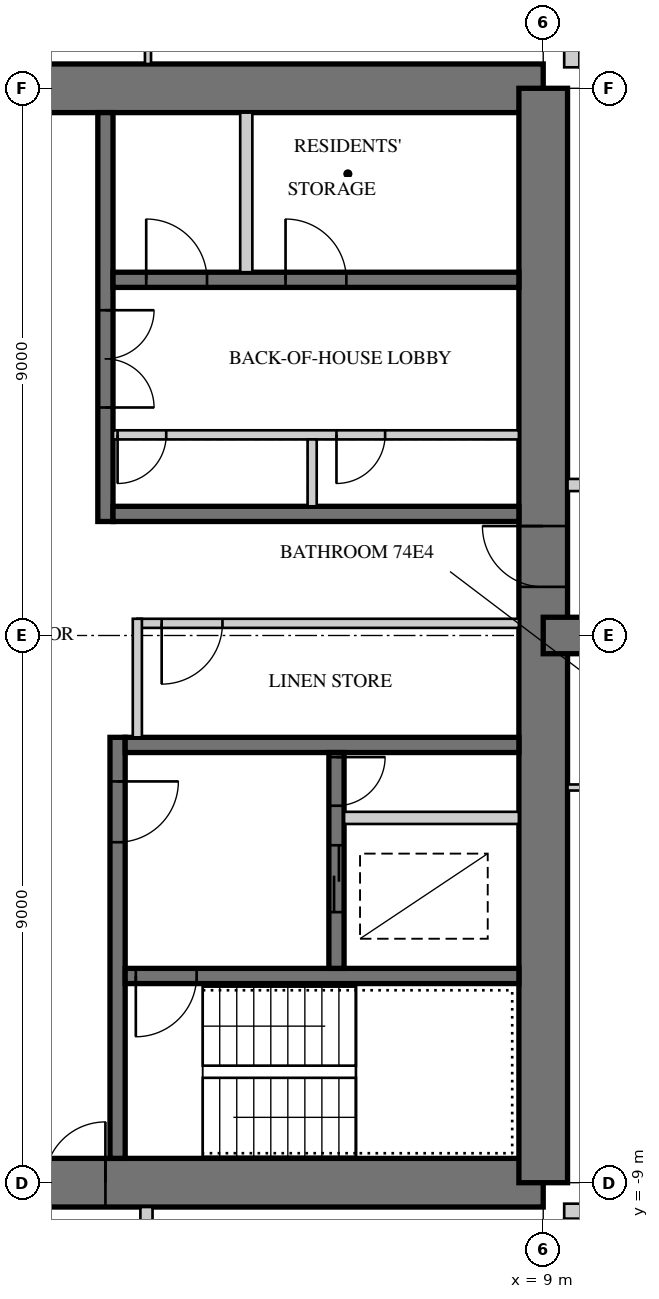
"""IFC4 building model, lengths in metres.
Left out: names, types, materials, properties, quantities, classifications, styles, units other than length and angle.
Written with IfcOpenShell. Run it as: python <this file> out.ifc"""

import sys

from ifc_helpers import new_model, si_unit, direction, frame, frame_2d, origin, place, context, subcontext, project, spatial, rectangle, extrude, element, fill, save


model = new_model("IFC4")
c1 = context("Model", 3, precision=1e-05, world=origin(), true_north=direction((0.0, 1.0)))
c2 = subcontext(c1, "Body", "Model", "MODEL_VIEW")
j1 = project(units=[si_unit("LENGTHUNIT", "METRE"), si_unit("PLANEANGLEUNIT", "RADIAN")], contexts=[c1])
p1 = place(None, origin())
s1 = spatial("IfcSite", under=j1, at=p1, CompositionType="ELEMENT")
p2 = place(p1, origin())
s2 = spatial("IfcBuilding", under=s1, at=p2, CompositionType="ELEMENT")
p3 = place(p2, frame((0.0, 0.0, 284.9)))
s3 = spatial("IfcBuildingStorey", under=s2, at=p3, CompositionType="ELEMENT", Elevation=284.9)
p4 = place(p3, frame((9.0, 9.0, 0.0), z_axis=(0.0, 0.0, 1.0), x_axis=(-1.0, 0.0, 0.0)))
e1 = element("IfcWall", 1, at=p4, inside=s3, PredefinedType="SHEAR", context=c2, shape_type="SweptSolid", body=[
    extrude(rectangle(XDim=18.0, YDim=0.8, at=frame_2d((9.0, 0.0))), origin(), (0.0, 0.0, 1.0), 3.4),
])
p5 = place(p4, frame((9.8, 0.0, 0.0)))
e2 = element("IfcOpeningElement", 2, at=p5, cuts=e1, PredefinedType="OPENING", context=c2, shape_type="SweptSolid", body=[
    extrude(rectangle(XDim=1.0, YDim=2.4, at=frame_2d((0.5, 1.2))), frame((0.0, 0.41, 0.0), z_axis=(0.0, -1.0, 0.0), x_axis=(1.0, 0.0, 0.0)), (0.0, 0.0, 1.0), 0.82),
])
p6 = place(p3, frame((-9.0, -9.0, 0.0), z_axis=(0.0, 0.0, 1.0), x_axis=(1.0, 0.0, 0.0)))
e3 = element("IfcWall", 3, at=p6, inside=s3, PredefinedType="SHEAR", context=c2, shape_type="SweptSolid", body=[
    extrude(rectangle(XDim=18.0, YDim=0.8, at=frame_2d((9.0, 0.0))), origin(), (0.0, 0.0, 1.0), 3.4),
])
p7 = place(p6, frame((9.8, 0.0, 0.0)))
e4 = element("IfcOpeningElement", 4, at=p7, cuts=e3, PredefinedType="OPENING", context=c2, shape_type="SweptSolid", body=[
    extrude(rectangle(XDim=1.0, YDim=2.4, at=frame_2d((0.5, 1.2))), frame((0.0, 0.41, 0.0), z_axis=(0.0, -1.0, 0.0), x_axis=(1.0, 0.0, 0.0)), (0.0, 0.0, 1.0), 0.82),
])
p8 = place(p3, frame((9.0, -9.0, 0.0), z_axis=(0.0, 0.0, 1.0), x_axis=(0.0, 1.0, 0.0)))
e5 = element("IfcWall", 5, at=p8, inside=s3, PredefinedType="SHEAR", context=c2, shape_type="SweptSolid", body=[
    extrude(rectangle(XDim=18.0, YDim=0.8, at=frame_2d((9.0, 0.0))), origin(), (0.0, 0.0, 1.0), 3.4),
])
p9 = place(p8, frame((9.8, 0.0, 0.0)))
e6 = element("IfcOpeningElement", 6, at=p9, cuts=e5, PredefinedType="OPENING", context=c2, shape_type="SweptSolid", body=[
    extrude(rectangle(XDim=1.0, YDim=2.4, at=frame_2d((0.5, 1.2))), frame((0.0, 0.41, 0.0), z_axis=(0.0, -1.0, 0.0), x_axis=(1.0, 0.0, 0.0)), (0.0, 0.0, 1.0), 0.82),
])
p10 = place(p3, frame((1.8, 1.875, 0.0), z_axis=(0.0, 0.0, 1.0), x_axis=(0.0, 1.0, 0.0)))
e7 = element("IfcWall", 7, at=p10, inside=s3, PredefinedType="SHEAR", context=c2, shape_type="SweptSolid", body=[
    extrude(rectangle(XDim=6.725, YDim=0.25, at=frame_2d((3.363, 0.0))), origin(), (0.0, 0.0, 1.0), 3.4),
])
p11 = place(p10, frame((1.875, 0.0, 0.0)))
e8 = element("IfcOpeningElement", 8, at=p11, cuts=e7, PredefinedType="OPENING", context=c2, shape_type="SweptSolid", body=[
    extrude(rectangle(XDim=1.6, YDim=2.4, at=frame_2d((0.8, 1.2))), frame((0.0, 0.135, 0.0), z_axis=(0.0, -1.0, 0.0), x_axis=(1.0, 0.0, 0.0)), (0.0, 0.0, 1.0), 0.27),
])
p12 = place(p3, frame((1.925, 2.0, 0.0), z_axis=(0.0, 0.0, 1.0), x_axis=(1.0, 0.0, 0.0)))
e9 = element("IfcWall", 9, at=p12, inside=s3, PredefinedType="SHEAR", context=c2, shape_type="SweptSolid", body=[
    extrude(rectangle(XDim=6.675, YDim=0.25, at=frame_2d((3.337, 0.0))), origin(), (0.0, 0.0, 1.0), 3.4),
])
p13 = place(p3, frame((1.925, 5.85, 0.0), z_axis=(0.0, 0.0, 1.0), x_axis=(1.0, 0.0, 0.0)))
e10 = element("IfcWall", 10, at=p13, inside=s3, PredefinedType="SHEAR", context=c2, shape_type="SweptSolid", body=[
    extrude(rectangle(XDim=6.675, YDim=0.25, at=frame_2d((3.337, 0.0))), origin(), (0.0, 0.0, 1.0), 3.4),
])
p14 = place(p13, frame((0.546, 0.0, 0.0)))
e11 = element("IfcOpeningElement", 11, at=p14, cuts=e10, PredefinedType="OPENING", context=c2, shape_type="SweptSolid", body=[
    extrude(rectangle(XDim=1.0, YDim=2.1, at=frame_2d((0.5, 1.05))), frame((0.0, 0.135, 0.0), z_axis=(0.0, -1.0, 0.0), x_axis=(1.0, 0.0, 0.0)), (0.0, 0.0, 1.0), 0.27),
])
p15 = place(p13, frame((2.837, 0.0, 0.0)))
e12 = element("IfcOpeningElement", 12, at=p15, cuts=e10, PredefinedType="OPENING", context=c2, shape_type="SweptSolid", body=[
    extrude(rectangle(XDim=1.0, YDim=2.1, at=frame_2d((0.5, 1.05))), frame((0.0, 0.135, 0.0), z_axis=(0.0, -1.0, 0.0), x_axis=(1.0, 0.0, 0.0)), (0.0, 0.0, 1.0), 0.27),
])
p16 = place(p3, frame((1.925, 3.3, 0.0), z_axis=(0.0, 0.0, 1.0), x_axis=(1.0, 0.0, 0.0)))
e13 = element("IfcWall", 13, at=p16, inside=s3, PredefinedType="PARTITIONING", context=c2, shape_type="SweptSolid", body=[
    extrude(rectangle(XDim=6.675, YDim=0.15, at=frame_2d((3.337, 0.0))), origin(), (0.0, 0.0, 1.0), 3.4),
])
p17 = place(p16, frame((0.075, 0.0, 0.0)))
e14 = element("IfcOpeningElement", 14, at=p17, cuts=e13, PredefinedType="OPENING", context=c2, shape_type="SweptSolid", body=[
    extrude(rectangle(XDim=0.8, YDim=2.1, at=frame_2d((0.4, 1.05))), frame((0.0, 0.085, 0.0), z_axis=(0.0, -1.0, 0.0), x_axis=(1.0, 0.0, 0.0)), (0.0, 0.0, 1.0), 0.17),
])
p18 = place(p16, frame((3.675, 0.0, 0.0)))
e15 = element("IfcOpeningElement", 15, at=p18, cuts=e13, PredefinedType="OPENING", context=c2, shape_type="SweptSolid", body=[
    extrude(rectangle(XDim=0.8, YDim=2.1, at=frame_2d((0.4, 1.05))), frame((0.0, 0.085, 0.0), z_axis=(0.0, -1.0, 0.0), x_axis=(1.0, 0.0, 0.0)), (0.0, 0.0, 1.0), 0.17),
])
p19 = place(p3, frame((5.2, 2.125, 0.0), z_axis=(0.0, 0.0, 1.0), x_axis=(0.0, 1.0, 0.0)))
e16 = element("IfcWall", 16, at=p19, inside=s3, PredefinedType="PARTITIONING", context=c2, shape_type="SweptSolid", body=[
    extrude(rectangle(XDim=1.1, YDim=0.15, at=frame_2d((0.55, 0.0))), origin(), (0.0, 0.0, 1.0), 3.4),
])
p20 = place(p3, frame((4.117, 5.975, 0.0), z_axis=(0.0, 0.0, 1.0), x_axis=(0.0, 1.0, 0.0)))
e17 = element("IfcWall", 17, at=p20, inside=s3, PredefinedType="PARTITIONING", context=c2, shape_type="SweptSolid", body=[
    extrude(rectangle(XDim=2.625, YDim=0.2, at=frame_2d((1.312, 0.0))), origin(), (0.0, 0.0, 1.0), 3.4),
])
p21 = place(p3, frame((2.0, -1.675, 0.0), z_axis=(0.0, 0.0, 1.0), x_axis=(0.0, -1.0, 0.0)))
e18 = element("IfcWall", 18, at=p21, inside=s3, PredefinedType="SHEAR", context=c2, shape_type="SweptSolid", body=[
    extrude(rectangle(XDim=6.925, YDim=0.25, at=frame_2d((3.462, 0.0))), origin(), (0.0, 0.0, 1.0), 3.4),
])
p22 = place(p21, frame((0.725, 0.0, 0.0)))
e19 = element("IfcOpeningElement", 19, at=p22, cuts=e18, PredefinedType="OPENING", context=c2, shape_type="SweptSolid", body=[
    extrude(rectangle(XDim=1.0, YDim=2.1, at=frame_2d((0.5, 1.05))), frame((0.0, 0.135, 0.0), z_axis=(0.0, -1.0, 0.0), x_axis=(1.0, 0.0, 0.0)), (0.0, 0.0, 1.0), 0.27),
])
p23 = place(p3, frame((2.125, -1.8, 0.0), z_axis=(0.0, 0.0, 1.0), x_axis=(1.0, 0.0, 0.0)))
e20 = element("IfcWall", 20, at=p23, inside=s3, PredefinedType="SHEAR", context=c2, shape_type="SweptSolid", body=[
    extrude(rectangle(XDim=6.475, YDim=0.25, at=frame_2d((3.238, 0.0))), origin(), (0.0, 0.0, 1.0), 3.4),
])
p24 = place(p3, frame((2.125, -5.6, 0.0), z_axis=(0.0, 0.0, 1.0), x_axis=(1.0, 0.0, 0.0)))
e21 = element("IfcWall", 21, at=p24, inside=s3, PredefinedType="SHEAR", context=c2, shape_type="SweptSolid", body=[
    extrude(rectangle(XDim=6.475, YDim=0.25, at=frame_2d((3.238, 0.0))), origin(), (0.0, 0.0, 1.0), 3.4),
])
p25 = place(p24, frame((0.175, 0.0, 0.0)))
e22 = element("IfcOpeningElement", 22, at=p25, cuts=e21, PredefinedType="OPENING", context=c2, shape_type="SweptSolid", body=[
    extrude(rectangle(XDim=1.0, YDim=2.1, at=frame_2d((0.5, 1.05))), frame((0.0, 0.135, 0.0), z_axis=(0.0, -1.0, 0.0), x_axis=(1.0, 0.0, 0.0)), (0.0, 0.0, 1.0), 0.27),
])
p26 = place(p3, frame((5.6, -1.925, 0.0), z_axis=(0.0, 0.0, 1.0), x_axis=(0.0, -1.0, 0.0)))
e23 = element("IfcWall", 23, at=p26, inside=s3, PredefinedType="SHEAR", context=c2, shape_type="SweptSolid", body=[
    extrude(rectangle(XDim=3.55, YDim=0.25, at=frame_2d((1.775, 0.0))), origin(), (0.0, 0.0, 1.0), 3.4),
])
p27 = place(p26, frame((1.525, 0.0, 0.0)))
e24 = element("IfcOpeningElement", 24, at=p27, cuts=e23, PredefinedType="OPENING", context=c2, shape_type="SweptSolid", body=[
    extrude(rectangle(XDim=1.1, YDim=2.2, at=frame_2d((0.55, 1.1))), frame((0.0, 0.135, 0.0), z_axis=(0.0, -1.0, 0.0), x_axis=(1.0, 0.0, 0.0)), (0.0, 0.0, 1.0), 0.27),
])
p28 = place(p26, frame((0.075, 0.0, 0.0)))
e25 = element("IfcOpeningElement", 25, at=p28, cuts=e23, PredefinedType="OPENING", context=c2, shape_type="SweptSolid", body=[
    extrude(rectangle(XDim=0.8, YDim=2.1, at=frame_2d((0.4, 1.05))), frame((0.0, 0.135, 0.0), z_axis=(0.0, -1.0, 0.0), x_axis=(1.0, 0.0, 0.0)), (0.0, 0.0, 1.0), 0.27),
])
p29 = place(p3, frame((5.725, -3.0, 0.0), z_axis=(0.0, 0.0, 1.0), x_axis=(1.0, 0.0, 0.0)))
e26 = element("IfcWall", 26, at=p29, inside=s3, PredefinedType="PARTITIONING", context=c2, shape_type="SweptSolid", body=[
    extrude(rectangle(XDim=2.875, YDim=0.2, at=frame_2d((1.438, 0.0))), origin(), (0.0, 0.0, 1.0), 3.4),
])
p30 = place(p3, frame((9.0, 0.0, 0.0), z_axis=(0.0, 0.0, 1.0), x_axis=(1.0, 0.0, 0.0)))
e27 = element("IfcWall", 27, at=p30, inside=s3, PredefinedType="SHEAR", context=c2, shape_type="SweptSolid", body=[
    extrude(rectangle(XDim=9.0, YDim=0.6, at=frame_2d((4.5, 0.0))), origin(), (0.0, 0.0, 1.0), 3.4),
])
p31 = place(p30, frame((3.8, 0.0, 0.0)))
e28 = element("IfcOpeningElement", 28, at=p31, cuts=e27, PredefinedType="OPENING", context=c2, shape_type="SweptSolid", body=[
    extrude(rectangle(XDim=1.0, YDim=2.15, at=frame_2d((0.5, 1.075))), frame((0.0, 0.31, 0.0), z_axis=(0.0, -1.0, 0.0), x_axis=(1.0, 0.0, 0.0)), (0.0, 0.0, 1.0), 0.62),
])
p32 = place(p30, frame((7.0, 0.0, 0.0)))
e29 = element("IfcOpeningElement", 29, at=p32, cuts=e27, PredefinedType="OPENING", context=c2, shape_type="SweptSolid", body=[
    extrude(rectangle(XDim=1.0, YDim=2.2, at=frame_2d((0.5, 1.1))), frame((0.0, 0.31, 0.0), z_axis=(0.0, -1.0, 0.0), x_axis=(1.0, 0.0, 0.0)), (0.0, 0.0, 1.0), 0.62),
])
p33 = place(p3, frame((9.345, -9.47, 0.0), z_axis=(0.0, 0.0, 1.0), x_axis=(1.0, 0.0, 0.0)))
e30 = element("IfcWall", 30, at=p33, inside=s3, PredefinedType="SOLIDWALL", context=c2, shape_type="SweptSolid", body=[
    extrude(rectangle(XDim=3.125, YDim=0.25, at=frame_2d((1.562, 0.0))), origin(), (0.0, 0.0, 1.0), 3.2),
])
p34 = place(p33, frame((0.6, 0.0, 0.0)))
e31 = element("IfcOpeningElement", 31, at=p34, cuts=e30, PredefinedType="OPENING", context=c2, shape_type="SweptSolid", body=[
    extrude(rectangle(XDim=1.0, YDim=2.2, at=frame_2d((0.5, 1.1))), frame((0.0, 0.135, 0.0), z_axis=(0.0, -1.0, 0.0), x_axis=(1.0, 0.0, 0.0)), (0.0, 0.0, 1.0), 0.27),
])
p35 = place(p3, frame((12.47, 9.47, 0.0), z_axis=(0.0, 0.0, 1.0), x_axis=(-1.0, 0.0, 0.0)))
e32 = element("IfcWall", 32, at=p35, inside=s3, PredefinedType="SOLIDWALL", context=c2, shape_type="SweptSolid", body=[
    extrude(rectangle(XDim=2.875, YDim=0.25, at=frame_2d((1.438, 0.0))), origin(), (0.0, 0.0, 1.0), 3.2),
])
p36 = place(p35, frame((0.6, 0.0, 0.0)))
e33 = element("IfcOpeningElement", 33, at=p36, cuts=e32, PredefinedType="OPENING", context=c2, shape_type="SweptSolid", body=[
    extrude(rectangle(XDim=1.0, YDim=2.2, at=frame_2d((0.5, 1.1))), frame((0.0, 0.135, 0.0), z_axis=(0.0, -1.0, 0.0), x_axis=(1.0, 0.0, 0.0)), (0.0, 0.0, 1.0), 0.27),
])
p37 = place(p3, frame((9.47, 9.345, 0.0), z_axis=(0.0, 0.0, 1.0), x_axis=(0.0, 1.0, 0.0)))
e34 = element("IfcWall", 34, at=p37, inside=s3, PredefinedType="SOLIDWALL", context=c2, shape_type="SweptSolid", body=[
    extrude(rectangle(XDim=3.125, YDim=0.25, at=frame_2d((1.562, 0.0))), origin(), (0.0, 0.0, 1.0), 3.2),
])
p38 = place(p37, frame((0.6, 0.0, 0.0)))
e35 = element("IfcOpeningElement", 35, at=p38, cuts=e34, PredefinedType="OPENING", context=c2, shape_type="SweptSolid", body=[
    extrude(rectangle(XDim=1.0, YDim=2.2, at=frame_2d((0.5, 1.1))), frame((0.0, 0.135, 0.0), z_axis=(0.0, -1.0, 0.0), x_axis=(1.0, 0.0, 0.0)), (0.0, 0.0, 1.0), 0.27),
])
p39 = place(p3, frame((9.47, -12.47, 0.0), z_axis=(0.0, 0.0, 1.0), x_axis=(0.0, 1.0, 0.0)))
e36 = element("IfcWall", 36, at=p39, inside=s3, PredefinedType="SOLIDWALL", context=c2, shape_type="SweptSolid", body=[
    extrude(rectangle(XDim=2.875, YDim=0.25, at=frame_2d((1.438, 0.0))), origin(), (0.0, 0.0, 1.0), 3.2),
])
p40 = place(p39, frame((0.6, 0.0, 0.0)))
e37 = element("IfcOpeningElement", 37, at=p40, cuts=e36, PredefinedType="OPENING", context=c2, shape_type="SweptSolid", body=[
    extrude(rectangle(XDim=1.0, YDim=2.2, at=frame_2d((0.5, 1.1))), frame((0.0, 0.135, 0.0), z_axis=(0.0, -1.0, 0.0), x_axis=(1.0, 0.0, 0.0)), (0.0, 0.0, 1.0), 0.27),
])
p41 = place(p3, frame((2.325, 0.2, 0.0), z_axis=(0.0, 0.0, 1.0), x_axis=(1.0, 0.0, 0.0)))
e38 = element("IfcWall", 38, at=p41, inside=s3, PredefinedType="PARTITIONING", context=c2, shape_type="SweptSolid", body=[
    extrude(rectangle(XDim=6.275, YDim=0.15, at=frame_2d((3.138, 0.0))), origin(), (0.0, 0.0, 1.0), 3.2),
])
p42 = place(p41, frame((0.4, 0.0, 0.0)))
e39 = element("IfcOpeningElement", 39, at=p42, cuts=e38, PredefinedType="OPENING", context=c2, shape_type="SweptSolid", body=[
    extrude(rectangle(XDim=1.0, YDim=2.1, at=frame_2d((0.5, 1.05))), frame((0.0, 0.085, 0.0), z_axis=(0.0, -1.0, 0.0), x_axis=(1.0, 0.0, 0.0)), (0.0, 0.0, 1.0), 0.17),
])
p43 = place(p3, frame((2.325, -1.675, 0.0), z_axis=(0.0, 0.0, 1.0), x_axis=(0.0, 1.0, 0.0)))
e40 = element("IfcWall", 40, at=p43, inside=s3, PredefinedType="PARTITIONING", context=c2, shape_type="SweptSolid", body=[
    extrude(rectangle(XDim=1.95, YDim=0.15, at=frame_2d((0.975, 0.0))), origin(), (0.0, 0.0, 1.0), 3.2),
])
for number, where, z_axis, x_axis in (
    (41, (2.5, 9.4, 0.0), (0.0, 0.0, 1.0), (0.0, 1.0, 0.0)),
    (42, (9.4, -2.5, 0.0), (0.0, 0.0, 1.0), (1.0, 0.0, 0.0)),
):
    element("IfcWall", number, at=place(p3, frame(where, z_axis=z_axis, x_axis=x_axis)), inside=s3, PredefinedType="PARTITIONING", context=c2, shape_type="SweptSolid", body=[
        extrude(rectangle(XDim=2.65, YDim=0.1, at=frame_2d((1.325, 0.0))), origin(), (0.0, 0.0, 1.0), 3.2),
    ])
p44 = place(p3, frame((9.4, 2.475, 0.0), z_axis=(0.0, 0.0, 1.0), x_axis=(1.0, 0.0, 0.0)))
e43 = element("IfcWall", 43, at=p44, inside=s3, PredefinedType="SOLIDWALL", context=c2, shape_type="SweptSolid", body=[
    extrude(rectangle(XDim=5.6, YDim=0.2, at=frame_2d((2.8, 0.0))), origin(), (0.0, 0.0, 1.0), 3.2),
])
p45 = place(p44, frame((0.6, 0.0, 0.0)))
e44 = element("IfcOpeningElement", 44, at=p45, cuts=e43, PredefinedType="OPENING", context=c2, shape_type="SweptSolid", body=[
    extrude(rectangle(XDim=1.0, YDim=2.15, at=frame_2d((0.5, 1.075))), frame((0.0, 0.11, 0.0), z_axis=(0.0, -1.0, 0.0), x_axis=(1.0, 0.0, 0.0)), (0.0, 0.0, 1.0), 0.22),
])
p46 = place(p3, frame((2.475, -9.4, 0.0), z_axis=(0.0, 0.0, 1.0), x_axis=(0.0, -1.0, 0.0)))
e45 = element("IfcWall", 45, at=p46, inside=s3, PredefinedType="SOLIDWALL", context=c2, shape_type="SweptSolid", body=[
    extrude(rectangle(XDim=5.6, YDim=0.2, at=frame_2d((2.8, 0.0))), origin(), (0.0, 0.0, 1.0), 3.2),
])
p47 = place(p46, frame((0.6, 0.0, 0.0)))
e46 = element("IfcOpeningElement", 46, at=p47, cuts=e45, PredefinedType="OPENING", context=c2, shape_type="SweptSolid", body=[
    extrude(rectangle(XDim=1.0, YDim=2.15, at=frame_2d((0.5, 1.075))), frame((0.0, 0.11, 0.0), z_axis=(0.0, -1.0, 0.0), x_axis=(1.0, 0.0, 0.0)), (0.0, 0.0, 1.0), 0.22),
])
p48 = place(p42, frame((1.0, 0.0, 0.0), z_axis=(0.0, 0.0, 1.0), x_axis=(-1.0, 0.0, 0.0)))
e47 = element("IfcDoor", 47, at=p48, inside=s3, OperationType="SINGLE_SWING_RIGHT", PredefinedType="DOOR", context=c2, shape_type="SweptSolid", body=[
    extrude(rectangle(XDim=1.0, YDim=2.1, at=frame_2d((0.5, 1.05))), frame((0.0, 0.025, 0.0), z_axis=(0.0, -1.0, 0.0), x_axis=(1.0, 0.0, 0.0)), (0.0, 0.0, 1.0), 0.05),
])
fill(e39, e47)
p49 = place(p7, origin())
e48 = element("IfcDoor", 48, at=p49, inside=s3, OperationType="SINGLE_SWING_RIGHT", PredefinedType="DOOR", context=c2, shape_type="SweptSolid", body=[
    extrude(rectangle(XDim=1.0, YDim=2.4, at=frame_2d((0.5, 1.2))), frame((0.0, 0.055, 0.0), z_axis=(0.0, -1.0, 0.0), x_axis=(1.0, 0.0, 0.0)), (0.0, 0.0, 1.0), 0.05),
])
fill(e4, e48)
p50 = place(p9, origin())
e49 = element("IfcDoor", 49, at=p50, inside=s3, OperationType="SINGLE_SWING_RIGHT", PredefinedType="DOOR", context=c2, shape_type="SweptSolid", body=[
    extrude(rectangle(XDim=1.0, YDim=2.4, at=frame_2d((0.5, 1.2))), frame((0.0, 0.055, 0.0), z_axis=(0.0, -1.0, 0.0), x_axis=(1.0, 0.0, 0.0)), (0.0, 0.0, 1.0), 0.05),
])
fill(e6, e49)
p51 = place(p11, frame((1.6, 0.0, 0.0), z_axis=(0.0, 0.0, 1.0), x_axis=(-1.0, 0.0, 0.0)))
e50 = element("IfcDoor", 50, at=p51, inside=s3, OperationType="DOUBLE_DOOR_SINGLE_SWING", PredefinedType="DOOR", context=c2, shape_type="SweptSolid", body=[
    extrude(rectangle(XDim=1.6, YDim=2.4, at=frame_2d((0.8, 1.2))), frame((0.0, 0.025, 0.0), z_axis=(0.0, -1.0, 0.0), x_axis=(1.0, 0.0, 0.0)), (0.0, 0.0, 1.0), 0.05),
])
fill(e8, e50)
p52 = place(p17, frame((0.8, 0.0, 0.0), z_axis=(0.0, 0.0, 1.0), x_axis=(-1.0, 0.0, 0.0)))
e51 = element("IfcDoor", 51, at=p52, inside=s3, OperationType="SINGLE_SWING_RIGHT", PredefinedType="DOOR", context=c2, shape_type="SweptSolid", body=[
    extrude(rectangle(XDim=0.8, YDim=2.1, at=frame_2d((0.4, 1.05))), frame((0.0, 0.025, 0.0), z_axis=(0.0, -1.0, 0.0), x_axis=(1.0, 0.0, 0.0)), (0.0, 0.0, 1.0), 0.05),
])
fill(e14, e51)
p53 = place(p18, frame((0.8, 0.0, 0.0), z_axis=(0.0, 0.0, 1.0), x_axis=(-1.0, 0.0, 0.0)))
e52 = element("IfcDoor", 52, at=p53, inside=s3, OperationType="SINGLE_SWING_RIGHT", PredefinedType="DOOR", context=c2, shape_type="SweptSolid", body=[
    extrude(rectangle(XDim=0.8, YDim=2.1, at=frame_2d((0.4, 1.05))), frame((0.0, 0.025, 0.0), z_axis=(0.0, -1.0, 0.0), x_axis=(1.0, 0.0, 0.0)), (0.0, 0.0, 1.0), 0.05),
])
fill(e15, e52)
p54 = place(p22, origin())
e53 = element("IfcDoor", 53, at=p54, inside=s3, OperationType="SINGLE_SWING_LEFT", PredefinedType="DOOR", context=c2, shape_type="SweptSolid", body=[
    extrude(rectangle(XDim=1.0, YDim=2.1, at=frame_2d((0.5, 1.05))), frame((0.0, 0.025, 0.0), z_axis=(0.0, -1.0, 0.0), x_axis=(1.0, 0.0, 0.0)), (0.0, 0.0, 1.0), 0.05),
])
fill(e19, e53)
p55 = place(p25, frame((1.0, 0.0, 0.0), z_axis=(0.0, 0.0, 1.0), x_axis=(-1.0, 0.0, 0.0)))
e54 = element("IfcDoor", 54, at=p55, inside=s3, OperationType="SINGLE_SWING_RIGHT", PredefinedType="DOOR", context=c2, shape_type="SweptSolid", body=[
    extrude(rectangle(XDim=1.0, YDim=2.1, at=frame_2d((0.5, 1.05))), frame((0.0, 0.025, 0.0), z_axis=(0.0, -1.0, 0.0), x_axis=(1.0, 0.0, 0.0)), (0.0, 0.0, 1.0), 0.05),
])
fill(e22, e54)
p56 = place(p27, origin())
e55 = element("IfcDoor", 55, at=p56, inside=s3, OperationType="DOUBLE_DOOR_SLIDING", PredefinedType="DOOR", context=c2, shape_type="SweptSolid", body=[
    extrude(rectangle(XDim=1.1, YDim=2.2, at=frame_2d((0.55, 1.1))), frame((0.0, 0.025, 0.0), z_axis=(0.0, -1.0, 0.0), x_axis=(1.0, 0.0, 0.0)), (0.0, 0.0, 1.0), 0.05),
])
fill(e24, e55)
p57 = place(p28, origin())
e56 = element("IfcDoor", 56, at=p57, inside=s3, OperationType="SINGLE_SWING_LEFT", PredefinedType="DOOR", context=c2, shape_type="SweptSolid", body=[
    extrude(rectangle(XDim=0.8, YDim=2.1, at=frame_2d((0.4, 1.05))), frame((0.0, 0.025, 0.0), z_axis=(0.0, -1.0, 0.0), x_axis=(1.0, 0.0, 0.0)), (0.0, 0.0, 1.0), 0.05),
])
fill(e25, e56)
p58 = place(p14, origin())
e57 = element("IfcDoor", 57, at=p58, inside=s3, OperationType="SINGLE_SWING_LEFT", PredefinedType="DOOR", context=c2, shape_type="SweptSolid", body=[
    extrude(rectangle(XDim=1.0, YDim=2.1, at=frame_2d((0.5, 1.05))), frame((0.0, 0.025, 0.0), z_axis=(0.0, -1.0, 0.0), x_axis=(1.0, 0.0, 0.0)), (0.0, 0.0, 1.0), 0.05),
])
fill(e11, e57)
p59 = place(p15, origin())
e58 = element("IfcDoor", 58, at=p59, inside=s3, OperationType="SINGLE_SWING_LEFT", PredefinedType="DOOR", context=c2, shape_type="SweptSolid", body=[
    extrude(rectangle(XDim=1.0, YDim=2.1, at=frame_2d((0.5, 1.05))), frame((0.0, 0.025, 0.0), z_axis=(0.0, -1.0, 0.0), x_axis=(1.0, 0.0, 0.0)), (0.0, 0.0, 1.0), 0.05),
])
fill(e12, e58)
save(model, sys.argv[1])
